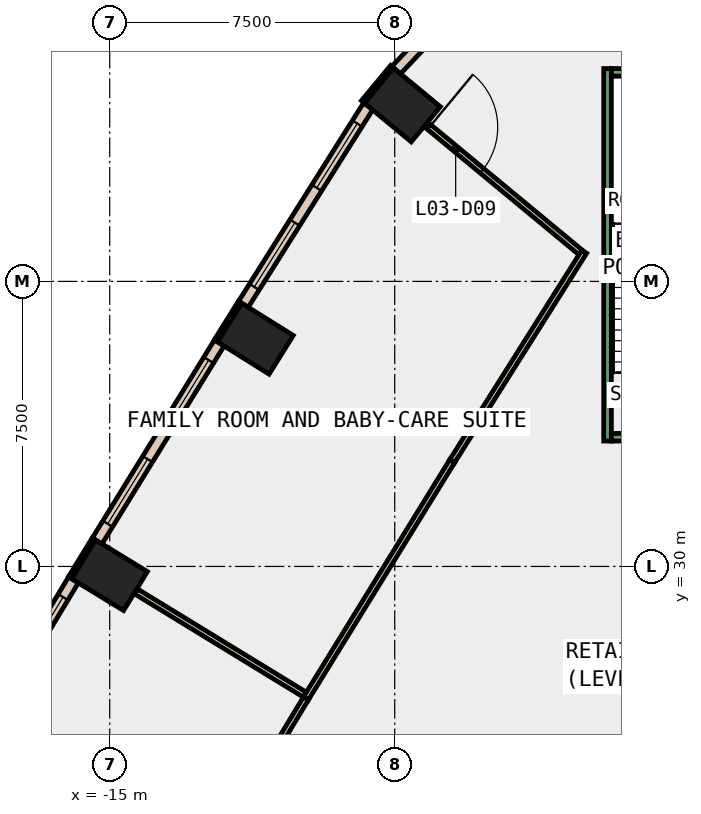
"""IFC4 building model, lengths in metres.
Left out: names, types, materials, properties, quantities, classifications, styles, units other than length and angle.
Written with IfcOpenShell. Run it as: python <this file> out.ifc"""

import sys

from ifc_helpers import new_model, si_unit, direction, frame, frame_2d, origin, origin_2d, place, context, subcontext, project, spatial, rectangle, extrude, element, fill, save


model = new_model("IFC4")
c1 = context("Model", 3, precision=1e-05, world=origin(), true_north=direction((0.0, 1.0)))
c2 = subcontext(c1, "Body", "Model", "MODEL_VIEW")
j1 = project(units=[si_unit("LENGTHUNIT", "METRE"), si_unit("PLANEANGLEUNIT", "RADIAN")], contexts=[c1])
p1 = place(None, origin())
s1 = spatial("IfcSite", under=j1, at=p1, CompositionType="ELEMENT")
p2 = place(p1, origin())
s2 = spatial("IfcBuilding", under=s1, at=p2, CompositionType="ELEMENT")
p3 = place(p2, frame((0.0, 0.0, 20.0)))
s3 = spatial("IfcBuildingStorey", under=s2, at=p3, CompositionType="ELEMENT", Elevation=20.0)
for number, where, z_axis, x_axis in (
    (1, (-7.299, 42.144, -0.45), (0.0, 0.0, 1.0), (0.638, 0.77, 0.0)),
    (2, (-11.167, 35.993, -0.45), (0.0, 0.0, 1.0), (0.53, 0.848, 0.0)),
    (3, (-15.005, 29.769, -0.45), (0.0, 0.0, 1.0), (0.522, 0.853, 0.0)),
):
    element("IfcColumn", number, at=place(p3, frame(where, z_axis=z_axis, x_axis=x_axis)), inside=s3, PredefinedType="COLUMN", context=c2, shape_type="SweptSolid", body=[
        extrude(rectangle(XDim=1.2, YDim=1.6, at=origin_2d()), origin(), (0.0, 0.0, 1.0), 5.0),
    ])
for number, where, z_axis, x_axis in (
    (4, (-7.571, 43.148, 0.0), (0.0, 0.0, 1.0), (-0.638, -0.77, 0.0)),
    (5, (-11.57, 36.952, 0.0), (0.0, 0.0, 1.0), (-0.53, -0.848, 0.0)),
):
    element("IfcWall", number, at=place(p3, frame(where, z_axis=z_axis, x_axis=x_axis)), inside=s3, PredefinedType="STANDARD", context=c2, shape_type="SweptSolid", body=[
        extrude(rectangle(XDim=1.199, YDim=0.1, at=frame_2d((0.6, 0.0))), origin(), (0.0, 0.0, 1.0), 4.55),
    ])
p4 = place(p3, frame((-15.417, 30.724, 0.0), z_axis=(0.0, 0.0, 1.0), x_axis=(-0.521507599072, -0.853246637327, 0.0)))
e6 = element("IfcWall", 6, at=p4, inside=s3, PredefinedType="STANDARD", context=c2, shape_type="SweptSolid", body=[
    extrude(rectangle(XDim=1.2, YDim=0.1, at=frame_2d((0.6, 0.0))), origin(), (0.0, 0.0, 1.0), 4.55),
])
p5 = place(p3, frame((-5.086, 45.573, 0.0), z_axis=(0.0, 0.0, 1.0), x_axis=(-0.687081126245, -0.726580708495, 0.0)))
e7 = element("IfcWall", 7, at=p5, inside=s3, PredefinedType="STANDARD", context=c2, shape_type="SweptSolid", body=[
    extrude(rectangle(XDim=3.461, YDim=0.3, at=frame_2d((1.73, 0.0))), origin(), (0.0, 0.0, 1.0), 4.55),
])
p6 = place(p5, frame((0.931, 0.0, 1.0)))
e8 = element("IfcOpeningElement", 8, at=p6, cuts=e7, PredefinedType="OPENING", context=c2, shape_type="SweptSolid", body=[
    extrude(rectangle(XDim=1.6, YDim=3.2, at=frame_2d((0.8, 1.6))), frame((0.0, 0.16, 0.0), z_axis=(0.0, -1.0, 0.0), x_axis=(1.0, 0.0, 0.0)), (0.0, 0.0, 1.0), 0.32),
])
p7 = place(p3, frame((-8.198, 42.111, 0.0), z_axis=(0.0, 0.0, 1.0), x_axis=(-0.53304020879, -0.846089910006, 0.0)))
e9 = element("IfcWall", 9, at=p7, inside=s3, PredefinedType="STANDARD", context=c2, shape_type="SweptSolid", body=[
    extrude(rectangle(XDim=6.163, YDim=0.3, at=frame_2d((3.081, 0.0))), origin(), (0.0, 0.0, 1.0), 4.55),
])
p8 = place(p7, frame((0.541, 0.0, 1.0)))
e10 = element("IfcOpeningElement", 10, at=p8, cuts=e9, PredefinedType="OPENING", context=c2, shape_type="SweptSolid", body=[
    extrude(rectangle(XDim=2.0, YDim=3.2, at=frame_2d((1.0, 1.6))), frame((0.0, 0.16, 0.0), z_axis=(0.0, -1.0, 0.0), x_axis=(1.0, 0.0, 0.0)), (0.0, 0.0, 1.0), 0.32),
])
p9 = place(p7, frame((3.622, 0.0, 1.0)))
e11 = element("IfcOpeningElement", 11, at=p9, cuts=e9, PredefinedType="OPENING", context=c2, shape_type="SweptSolid", body=[
    extrude(rectangle(XDim=2.0, YDim=3.2, at=frame_2d((1.0, 1.6))), frame((0.0, 0.16, 0.0), z_axis=(0.0, -1.0, 0.0), x_axis=(1.0, 0.0, 0.0)), (0.0, 0.0, 1.0), 0.32),
])
p10 = place(p3, frame((-12.117, 35.881, 0.0), z_axis=(0.0, 0.0, 1.0), x_axis=(-0.524953701886, -0.85113078365, 0.0)))
e12 = element("IfcWall", 12, at=p10, inside=s3, PredefinedType="STANDARD", context=c2, shape_type="SweptSolid", body=[
    extrude(rectangle(XDim=6.123, YDim=0.3, at=frame_2d((3.061, 0.0))), origin(), (0.0, 0.0, 1.0), 4.55),
])
p11 = place(p10, frame((0.531, 0.0, 1.0)))
e13 = element("IfcOpeningElement", 13, at=p11, cuts=e12, PredefinedType="OPENING", context=c2, shape_type="SweptSolid", body=[
    extrude(rectangle(XDim=2.0, YDim=3.2, at=frame_2d((1.0, 1.6))), frame((0.0, 0.16, 0.0), z_axis=(0.0, -1.0, 0.0), x_axis=(1.0, 0.0, 0.0)), (0.0, 0.0, 1.0), 0.32),
])
p12 = place(p10, frame((3.592, 0.0, 1.0)))
e14 = element("IfcOpeningElement", 14, at=p12, cuts=e12, PredefinedType="OPENING", context=c2, shape_type="SweptSolid", body=[
    extrude(rectangle(XDim=2.0, YDim=3.2, at=frame_2d((1.0, 1.6))), frame((0.0, 0.16, 0.0), z_axis=(0.0, -1.0, 0.0), x_axis=(1.0, 0.0, 0.0)), (0.0, 0.0, 1.0), 0.32),
])
p13 = place(p3, frame((-15.954, 29.647, 0.0), z_axis=(0.0, 0.0, 1.0), x_axis=(-0.516687651362, -0.85617397235, 0.0)))
e15 = element("IfcWall", 15, at=p13, inside=s3, PredefinedType="STANDARD", context=c2, shape_type="SweptSolid", body=[
    extrude(rectangle(XDim=6.121, YDim=0.3, at=frame_2d((3.061, 0.0))), origin(), (0.0, 0.0, 1.0), 4.55),
])
p14 = place(p13, frame((0.53, 0.0, 1.0)))
e16 = element("IfcOpeningElement", 16, at=p14, cuts=e15, PredefinedType="OPENING", context=c2, shape_type="SweptSolid", body=[
    extrude(rectangle(XDim=2.0, YDim=3.2, at=frame_2d((1.0, 1.6))), frame((0.0, 0.16, 0.0), z_axis=(0.0, -1.0, 0.0), x_axis=(1.0, 0.0, 0.0)), (0.0, 0.0, 1.0), 0.32),
])
p15 = place(p13, frame((3.591, 0.0, 1.0)))
e17 = element("IfcOpeningElement", 17, at=p15, cuts=e15, PredefinedType="OPENING", context=c2, shape_type="SweptSolid", body=[
    extrude(rectangle(XDim=2.0, YDim=3.2, at=frame_2d((1.0, 1.6))), frame((0.0, 0.16, 0.0), z_axis=(0.0, -1.0, 0.0), x_axis=(1.0, 0.0, 0.0)), (0.0, 0.0, 1.0), 0.32),
])
p16 = place(p3, frame((-9.801, 26.587, 0.0), z_axis=(0.0, 0.0, 1.0), x_axis=(-0.853133190526, 0.521693165781, 0.0)))
e18 = element("IfcWall", 18, at=p16, inside=s3, PredefinedType="PARTITIONING", context=c2, shape_type="SweptSolid", body=[
    extrude(rectangle(XDim=5.279, YDim=0.15, at=frame_2d((2.64, 0.0))), origin(), (0.0, 0.0, 1.0), 4.55),
])
p17 = place(p3, frame((-2.514, 38.28, 0.0), z_axis=(0.0, 0.0, 1.0), x_axis=(-0.533358613661, -0.845889229884, 0.0)))
e19 = element("IfcWall", 19, at=p17, inside=s3, PredefinedType="PARTITIONING", context=c2, shape_type="SweptSolid", body=[
    extrude(rectangle(XDim=6.517, YDim=0.15, at=frame_2d((3.259, 0.0))), origin(), (0.0, 0.0, 1.0), 4.55),
])
p18 = place(p3, frame((-5.99, 32.767, 0.0), z_axis=(0.0, 0.0, 1.0), x_axis=(-0.524805430661, -0.851222215376, 0.0)))
e20 = element("IfcWall", 20, at=p18, inside=s3, PredefinedType="PARTITIONING", context=c2, shape_type="SweptSolid", body=[
    extrude(rectangle(XDim=7.328, YDim=0.15, at=frame_2d((3.664, 0.0))), origin(), (0.0, 0.0, 1.0), 4.55),
])
p19 = place(p3, frame((-6.667, 41.621, 0.0), z_axis=(0.0, 0.0, 1.0), x_axis=(0.770357397594, -0.637612327336, 0.0)))
e21 = element("IfcWall", 21, at=p19, inside=s3, PredefinedType="PARTITIONING", context=c2, shape_type="SweptSolid", body=[
    extrude(rectangle(XDim=5.264, YDim=0.15, at=frame_2d((2.632, 0.0))), origin(), (0.0, 0.0, 1.0), 4.55),
])
p20 = place(p19, frame((0.1, 0.0, 0.0)))
e22 = element("IfcOpeningElement", 22, at=p20, cuts=e21, PredefinedType="OPENING", context=c2, shape_type="SweptSolid", body=[
    extrude(rectangle(XDim=1.8, YDim=2.1, at=frame_2d((0.9, 1.05))), frame((0.0, 0.085, 0.0), z_axis=(0.0, -1.0, 0.0), x_axis=(1.0, 0.0, 0.0)), (0.0, 0.0, 1.0), 0.17),
])
p21 = place(p3, frame((-9.836, 26.529, 0.0), z_axis=(0.0, 0.0, 1.0), x_axis=(-0.516524835149, -0.856272208281, 0.0)))
e23 = element("IfcWall", 23, at=p21, inside=s3, PredefinedType="PARTITIONING", context=c2, shape_type="SweptSolid", body=[
    extrude(rectangle(XDim=7.179, YDim=0.15, at=frame_2d((3.589, 0.0))), origin(), (0.0, 0.0, 1.0), 4.55),
])
p22 = place(p3, frame((-1.9, 33.3, 0.0), z_axis=(0.0, 0.0, 1.0), x_axis=(0.0, 1.0, 0.0)))
e24 = element("IfcWall", 24, at=p22, inside=s3, PredefinedType="STANDARD", context=c2, shape_type="SweptSolid", body=[
    extrude(rectangle(XDim=9.8, YDim=0.2, at=frame_2d((4.9, 0.0))), origin(), (0.0, 0.0, 1.0), 4.55),
])
p23 = place(p3, frame((1.8, 33.4, 0.0), z_axis=(0.0, 0.0, 1.0), x_axis=(-1.0, 0.0, 0.0)))
e25 = element("IfcWall", 25, at=p23, inside=s3, PredefinedType="STANDARD", context=c2, shape_type="SweptSolid", body=[
    extrude(rectangle(XDim=3.6, YDim=0.2, at=frame_2d((1.8, 0.0))), origin(), (0.0, 0.0, 1.0), 4.55),
])
p24 = place(p23, frame((1.2, 0.0, 0.0)))
e26 = element("IfcOpeningElement", 26, at=p24, cuts=e25, PredefinedType="OPENING", context=c2, shape_type="SweptSolid", body=[
    extrude(rectangle(XDim=1.2, YDim=2.2, at=frame_2d((0.6, 1.1))), frame((0.0, 0.11, 0.0), z_axis=(0.0, -1.0, 0.0), x_axis=(1.0, 0.0, 0.0)), (0.0, 0.0, 1.0), 0.22),
])
p25 = place(p3, frame((1.8, 43.0, 0.0), z_axis=(0.0, 0.0, 1.0), x_axis=(-1.0, 0.0, 0.0)))
e27 = element("IfcWall", 27, at=p25, inside=s3, PredefinedType="STANDARD", context=c2, shape_type="SweptSolid", body=[
    extrude(rectangle(XDim=3.6, YDim=0.2, at=frame_2d((1.8, 0.0))), origin(), (0.0, 0.0, 1.0), 4.55),
])
p26 = place(p8, origin())
e28 = element("IfcWindow", 28, at=p26, inside=s3, PartitioningType="SINGLE_PANEL", PredefinedType="WINDOW", context=c2, shape_type="SweptSolid", body=[
    extrude(rectangle(XDim=2.0, YDim=3.2, at=frame_2d((1.0, 1.6))), frame((0.0, 0.03, 0.0), z_axis=(0.0, -1.0, 0.0), x_axis=(1.0, 0.0, 0.0)), (0.0, 0.0, 1.0), 0.06),
])
fill(e10, e28)
p27 = place(p9, origin())
e29 = element("IfcWindow", 29, at=p27, inside=s3, PartitioningType="SINGLE_PANEL", PredefinedType="WINDOW", context=c2, shape_type="SweptSolid", body=[
    extrude(rectangle(XDim=2.0, YDim=3.2, at=frame_2d((1.0, 1.6))), frame((0.0, 0.03, 0.0), z_axis=(0.0, -1.0, 0.0), x_axis=(1.0, 0.0, 0.0)), (0.0, 0.0, 1.0), 0.06),
])
fill(e11, e29)
p28 = place(p11, origin())
e30 = element("IfcWindow", 30, at=p28, inside=s3, PartitioningType="SINGLE_PANEL", PredefinedType="WINDOW", context=c2, shape_type="SweptSolid", body=[
    extrude(rectangle(XDim=2.0, YDim=3.2, at=frame_2d((1.0, 1.6))), frame((0.0, 0.03, 0.0), z_axis=(0.0, -1.0, 0.0), x_axis=(1.0, 0.0, 0.0)), (0.0, 0.0, 1.0), 0.06),
])
fill(e13, e30)
p29 = place(p12, origin())
e31 = element("IfcWindow", 31, at=p29, inside=s3, PartitioningType="SINGLE_PANEL", PredefinedType="WINDOW", context=c2, shape_type="SweptSolid", body=[
    extrude(rectangle(XDim=2.0, YDim=3.2, at=frame_2d((1.0, 1.6))), frame((0.0, 0.03, 0.0), z_axis=(0.0, -1.0, 0.0), x_axis=(1.0, 0.0, 0.0)), (0.0, 0.0, 1.0), 0.06),
])
fill(e14, e31)
p30 = place(p14, origin())
e32 = element("IfcWindow", 32, at=p30, inside=s3, PartitioningType="SINGLE_PANEL", PredefinedType="WINDOW", context=c2, shape_type="SweptSolid", body=[
    extrude(rectangle(XDim=2.0, YDim=3.2, at=frame_2d((1.0, 1.6))), frame((0.0, 0.03, 0.0), z_axis=(0.0, -1.0, 0.0), x_axis=(1.0, 0.0, 0.0)), (0.0, 0.0, 1.0), 0.06),
])
fill(e16, e32)
p31 = place(p20, origin())
e33 = element("IfcDoor", 33, at=p31, inside=s3, OperationType="DOUBLE_DOOR_SINGLE_SWING", PredefinedType="DOOR", context=c2, shape_type="SweptSolid", body=[
    extrude(rectangle(XDim=1.8, YDim=2.1, at=frame_2d((0.9, 1.05))), frame((0.0, 0.025, 0.0), z_axis=(0.0, -1.0, 0.0), x_axis=(1.0, 0.0, 0.0)), (0.0, 0.0, 1.0), 0.05),
])
fill(e22, e33)
save(model, sys.argv[1])
